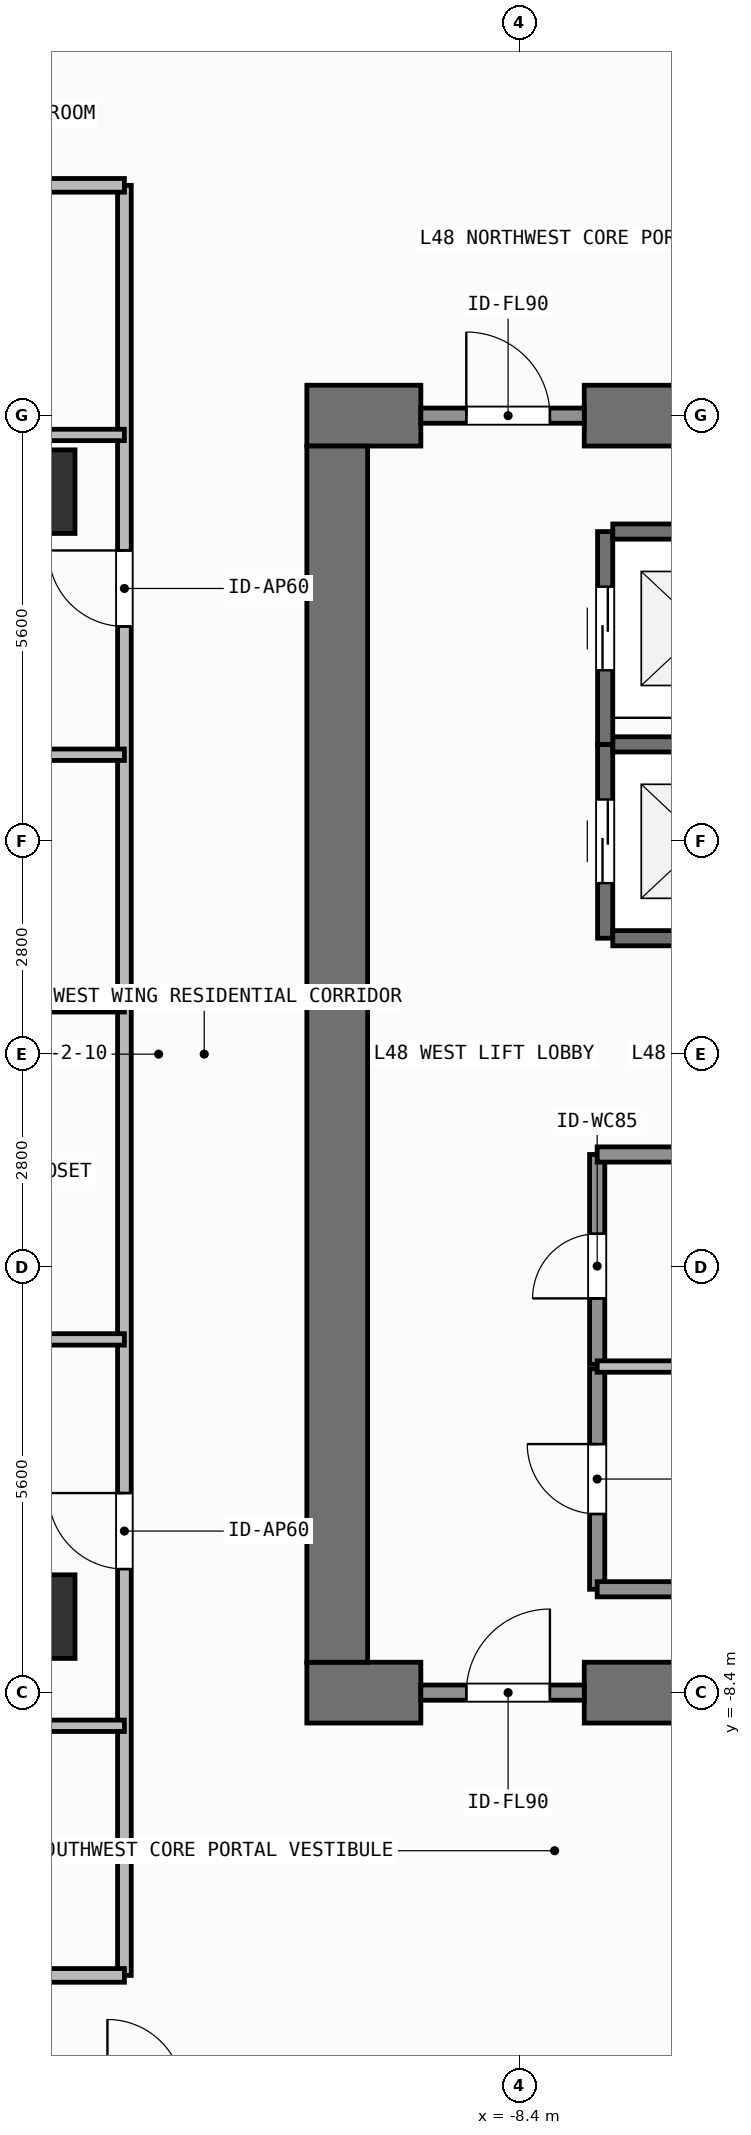
"""IFC4 building model, lengths in metres.
Left out: names, types, materials, properties, quantities, classifications, styles, units other than length and angle.
Written with IfcOpenShell. Run it as: python <this file> out.ifc"""

import sys

from ifc_helpers import new_model, si_unit, direction, frame, frame_2d, origin, origin_2d, place, context, subcontext, project, spatial, rectangle, extrude, element, fill, save


model = new_model("IFC4")
c1 = context("Model", 3, precision=1e-05, world=origin(), true_north=direction((0.0, 1.0)))
c2 = subcontext(c1, "Body", "Model", "MODEL_VIEW")
j1 = project(units=[si_unit("LENGTHUNIT", "METRE"), si_unit("PLANEANGLEUNIT", "RADIAN")], contexts=[c1])
p1 = place(None, origin())
s1 = spatial("IfcSite", under=j1, at=p1, CompositionType="ELEMENT")
p2 = place(p1, origin())
s2 = spatial("IfcBuilding", under=s1, at=p2, CompositionType="ELEMENT")
p3 = place(p2, frame((0.0, 0.0, 195.3)))
s3 = spatial("IfcBuildingStorey", under=s2, at=p3, CompositionType="ELEMENT", Elevation=195.3)
p4 = place(p3, frame((-11.2, -8.4, 0.0), z_axis=(0.0, 0.0, 1.0), x_axis=(1.0, 0.0, 0.0)))
e1 = element("IfcWall", 1, at=p4, inside=s3, PredefinedType="SHEAR", context=c2, shape_type="SweptSolid", body=[
    extrude(rectangle(XDim=1.5, YDim=0.8, at=frame_2d((0.75, 0.0))), origin(), (0.0, 0.0, 1.0), 3.9),
])
p5 = place(p3, frame((-7.55, -8.4, 0.0), z_axis=(0.0, 0.0, 1.0), x_axis=(1.0, 0.0, 0.0)))
e2 = element("IfcWall", 2, at=p5, inside=s3, PredefinedType="SHEAR", context=c2, shape_type="SweptSolid", body=[
    extrude(rectangle(XDim=3.35, YDim=0.8, at=frame_2d((1.675, 0.0))), origin(), (0.0, 0.0, 1.0), 3.9),
])
p6 = place(p3, frame((-11.2, 8.4, 0.0), z_axis=(0.0, 0.0, 1.0), x_axis=(1.0, 0.0, 0.0)))
e3 = element("IfcWall", 3, at=p6, inside=s3, PredefinedType="SHEAR", context=c2, shape_type="SweptSolid", body=[
    extrude(rectangle(XDim=1.5, YDim=0.8, at=frame_2d((0.75, 0.0))), origin(), (0.0, 0.0, 1.0), 3.9),
])
p7 = place(p3, frame((-7.55, 8.4, 0.0), z_axis=(0.0, 0.0, 1.0), x_axis=(1.0, 0.0, 0.0)))
e4 = element("IfcWall", 4, at=p7, inside=s3, PredefinedType="SHEAR", context=c2, shape_type="SweptSolid", body=[
    extrude(rectangle(XDim=16.35, YDim=0.8, at=frame_2d((8.175, 0.0))), origin(), (0.0, 0.0, 1.0), 3.9),
])
p8 = place(p3, frame((-10.8, -8.0, 0.0), z_axis=(0.0, 0.0, 1.0), x_axis=(0.0, 1.0, 0.0)))
e5 = element("IfcWall", 5, at=p8, inside=s3, PredefinedType="SHEAR", context=c2, shape_type="SweptSolid", body=[
    extrude(rectangle(XDim=16.0, YDim=0.8, at=frame_2d((8.0, 0.0))), origin(), (0.0, 0.0, 1.0), 3.9),
])
for number, where, z_axis, x_axis in (
    (6, (-14.8, -7.4, 0.0), (0.0, 0.0, 1.0), (1.0, 0.0, 0.0)),
    (7, (-14.8, 7.4, 0.0), (0.0, 0.0, 1.0), (1.0, 0.0, 0.0)),
):
    element("IfcColumn", number, at=place(p3, frame(where, z_axis=z_axis, x_axis=x_axis)), inside=s3, PredefinedType="COLUMN", context=c2, shape_type="SweptSolid", body=[
        extrude(rectangle(XDim=1.1, YDim=1.1, at=origin_2d()), origin(), (0.0, 0.0, 1.0), 3.9),
    ])
p9 = place(p3, frame((-7.275, 1.525, 0.0), z_axis=(0.0, 0.0, 1.0), x_axis=(0.0, 1.0, 0.0)))
e8 = element("IfcWall", 8, at=p9, inside=s3, PredefinedType="SHEAR", context=c2, shape_type="SweptSolid", body=[
    extrude(rectangle(XDim=2.55, YDim=0.2, at=frame_2d((1.275, 0.0))), origin(), (0.0, 0.0, 1.0), 3.68),
])
p10 = place(p9, frame((0.725, 0.0, 0.0)))
e9 = element("IfcOpeningElement", 9, at=p10, cuts=e8, PredefinedType="OPENING", context=c2, shape_type="SweptSolid", body=[
    extrude(rectangle(XDim=1.1, YDim=2.2, at=frame_2d((0.55, 1.1))), frame((0.0, 0.11, 0.0), z_axis=(0.0, -1.0, 0.0), x_axis=(1.0, 0.0, 0.0)), (0.0, 0.0, 1.0), 0.22),
])
for number, where, z_axis, x_axis in (
    (10, (-7.175, 1.525, 0.0), (0.0, 0.0, 1.0), (1.0, 0.0, 0.0)),
    (11, (-7.175, 4.075, 0.0), (0.0, 0.0, 1.0), (1.0, 0.0, 0.0)),
):
    element("IfcWall", number, at=place(p3, frame(where, z_axis=z_axis, x_axis=x_axis)), inside=s3, PredefinedType="SHEAR", context=c2, shape_type="SweptSolid", body=[
        extrude(rectangle(XDim=2.35, YDim=0.2, at=frame_2d((1.175, 0.0))), origin(), (0.0, 0.0, 1.0), 3.68),
    ])
p11 = place(p3, frame((-7.275, 4.075, 0.0), z_axis=(0.0, 0.0, 1.0), x_axis=(0.0, 1.0, 0.0)))
e12 = element("IfcWall", 12, at=p11, inside=s3, PredefinedType="SHEAR", context=c2, shape_type="SweptSolid", body=[
    extrude(rectangle(XDim=2.8, YDim=0.2, at=frame_2d((1.4, 0.0))), origin(), (0.0, 0.0, 1.0), 3.68),
])
p12 = place(p11, frame((0.975, 0.0, 0.0)))
e13 = element("IfcOpeningElement", 13, at=p12, cuts=e12, PredefinedType="OPENING", context=c2, shape_type="SweptSolid", body=[
    extrude(rectangle(XDim=1.1, YDim=2.2, at=frame_2d((0.55, 1.1))), frame((0.0, 0.11, 0.0), z_axis=(0.0, -1.0, 0.0), x_axis=(1.0, 0.0, 0.0)), (0.0, 0.0, 1.0), 0.22),
])
p13 = place(p3, frame((-7.175, 6.875, 0.0), z_axis=(0.0, 0.0, 1.0), x_axis=(1.0, 0.0, 0.0)))
e14 = element("IfcWall", 14, at=p13, inside=s3, PredefinedType="SHEAR", context=c2, shape_type="SweptSolid", body=[
    extrude(rectangle(XDim=2.35, YDim=0.2, at=frame_2d((1.175, 0.0))), origin(), (0.0, 0.0, 1.0), 3.68),
])
p14 = place(p3, frame((-9.7, -8.4, 0.0), z_axis=(0.0, 0.0, 1.0), x_axis=(1.0, 0.0, 0.0)))
e15 = element("IfcWall", 15, at=p14, inside=s3, PredefinedType="SOLIDWALL", context=c2, shape_type="SweptSolid", body=[
    extrude(rectangle(XDim=2.15, YDim=0.2, at=frame_2d((1.075, 0.0))), origin(), (0.0, 0.0, 1.0), 2.82),
])
p15 = place(p14, frame((0.598, 0.0, 0.0)))
e16 = element("IfcOpeningElement", 16, at=p15, cuts=e15, PredefinedType="OPENING", context=c2, shape_type="SweptSolid", body=[
    extrude(rectangle(XDim=1.1, YDim=2.15, at=frame_2d((0.55, 1.075))), frame((0.0, 0.11, 0.0), z_axis=(0.0, -1.0, 0.0), x_axis=(1.0, 0.0, 0.0)), (0.0, 0.0, 1.0), 0.22),
])
p16 = place(p3, frame((-9.7, 8.4, 0.0), z_axis=(0.0, 0.0, 1.0), x_axis=(1.0, 0.0, 0.0)))
e17 = element("IfcWall", 17, at=p16, inside=s3, PredefinedType="SOLIDWALL", context=c2, shape_type="SweptSolid", body=[
    extrude(rectangle(XDim=2.15, YDim=0.2, at=frame_2d((1.075, 0.0))), origin(), (0.0, 0.0, 1.0), 2.82),
])
p17 = place(p16, frame((0.598, 0.0, 0.0)))
e18 = element("IfcOpeningElement", 18, at=p17, cuts=e17, PredefinedType="OPENING", context=c2, shape_type="SweptSolid", body=[
    extrude(rectangle(XDim=1.1, YDim=2.15, at=frame_2d((0.55, 1.075))), frame((0.0, 0.11, 0.0), z_axis=(0.0, -1.0, 0.0), x_axis=(1.0, 0.0, 0.0)), (0.0, 0.0, 1.0), 0.22),
])
p18 = place(p3, frame((-7.38, -7.04, 0.0), z_axis=(0.0, 0.0, 1.0), x_axis=(0.0, 1.0, 0.0)))
e19 = element("IfcWall", 19, at=p18, inside=s3, PredefinedType="SOLIDWALL", context=c2, shape_type="SweptSolid", body=[
    extrude(rectangle(XDim=2.9, YDim=0.2, at=frame_2d((1.45, 0.0))), origin(), (0.0, 0.0, 1.0), 3.68),
])
p19 = place(p18, frame((0.99, 0.0, 0.0)))
e20 = element("IfcOpeningElement", 20, at=p19, cuts=e19, PredefinedType="OPENING", context=c2, shape_type="SweptSolid", body=[
    extrude(rectangle(XDim=0.92, YDim=2.1, at=frame_2d((0.46, 1.05))), frame((0.0, 0.11, 0.0), z_axis=(0.0, -1.0, 0.0), x_axis=(1.0, 0.0, 0.0)), (0.0, 0.0, 1.0), 0.22),
])
p20 = place(p3, frame((-7.38, -4.08, 0.0), z_axis=(0.0, 0.0, 1.0), x_axis=(0.0, 1.0, 0.0)))
e21 = element("IfcWall", 21, at=p20, inside=s3, PredefinedType="SOLIDWALL", context=c2, shape_type="SweptSolid", body=[
    extrude(rectangle(XDim=2.76, YDim=0.2, at=frame_2d((1.38, 0.0))), origin(), (0.0, 0.0, 1.0), 3.68),
])
p21 = place(p20, frame((0.867, 0.0, 0.0)))
e22 = element("IfcOpeningElement", 22, at=p21, cuts=e21, PredefinedType="OPENING", context=c2, shape_type="SweptSolid", body=[
    extrude(rectangle(XDim=0.85, YDim=2.1, at=frame_2d((0.425, 1.05))), frame((0.0, 0.11, 0.0), z_axis=(0.0, -1.0, 0.0), x_axis=(1.0, 0.0, 0.0)), (0.0, 0.0, 1.0), 0.22),
])
p22 = place(p3, frame((-13.6, -12.12, 0.0), z_axis=(0.0, 0.0, 1.0), x_axis=(0.0, 1.0, 0.0)))
e23 = element("IfcWall", 23, at=p22, inside=s3, PredefinedType="PARTITIONING", context=c2, shape_type="SweptSolid", body=[
    extrude(rectangle(XDim=12.764, YDim=0.18, at=frame_2d((6.382, 0.0))), origin(), (0.0, 0.0, 1.0), 3.68),
])
p23 = place(p22, frame((5.346, 0.0, 0.0)))
e24 = element("IfcOpeningElement", 24, at=p23, cuts=e23, PredefinedType="OPENING", context=c2, shape_type="SweptSolid", body=[
    extrude(rectangle(XDim=1.0, YDim=2.2, at=frame_2d((0.5, 1.1))), frame((0.0, 0.1, 0.0), z_axis=(0.0, -1.0, 0.0), x_axis=(1.0, 0.0, 0.0)), (0.0, 0.0, 1.0), 0.2),
])
p24 = place(p3, frame((-17.83, -3.753, 0.0), z_axis=(0.0, 0.0, 1.0), x_axis=(1.0, 0.0, 0.0)))
e25 = element("IfcWall", 25, at=p24, inside=s3, PredefinedType="PARTITIONING", context=c2, shape_type="SweptSolid", body=[
    extrude(rectangle(XDim=4.23, YDim=0.15, at=frame_2d((2.115, 0.0))), origin(), (0.0, 0.0, 1.0), 3.68),
])
p25 = place(p24, frame((1.6, 0.0, 0.0)))
e26 = element("IfcOpeningElement", 26, at=p25, cuts=e25, PredefinedType="OPENING", context=c2, shape_type="SweptSolid", body=[
    extrude(rectangle(XDim=0.85, YDim=2.1, at=frame_2d((0.425, 1.05))), frame((0.0, 0.085, 0.0), z_axis=(0.0, -1.0, 0.0), x_axis=(1.0, 0.0, 0.0)), (0.0, 0.0, 1.0), 0.17),
])
p26 = place(p3, frame((-20.769, -8.836, 0.0), z_axis=(0.0, 0.0, 1.0), x_axis=(1.0, 0.0, 0.0)))
e27 = element("IfcWall", 27, at=p26, inside=s3, PredefinedType="PARTITIONING", context=c2, shape_type="SweptSolid", body=[
    extrude(rectangle(XDim=7.169, YDim=0.15, at=frame_2d((3.584, 0.0))), origin(), (0.0, 0.0, 1.0), 3.68),
])
p27 = place(p26, frame((3.159, 0.0, 0.0)))
e28 = element("IfcOpeningElement", 28, at=p27, cuts=e27, PredefinedType="OPENING", context=c2, shape_type="SweptSolid", body=[
    extrude(rectangle(XDim=0.85, YDim=2.1, at=frame_2d((0.425, 1.05))), frame((0.0, 0.085, 0.0), z_axis=(0.0, -1.0, 0.0), x_axis=(1.0, 0.0, 0.0)), (0.0, 0.0, 1.0), 0.17),
])
p28 = place(p3, frame((-13.6, 0.644, 0.0), z_axis=(0.0, 0.0, 1.0), x_axis=(0.0, 1.0, 0.0)))
e29 = element("IfcWall", 29, at=p28, inside=s3, PredefinedType="PARTITIONING", context=c2, shape_type="SweptSolid", body=[
    extrude(rectangle(XDim=10.786, YDim=0.18, at=frame_2d((5.393, 0.0))), origin(), (0.0, 0.0, 1.0), 3.68),
])
p29 = place(p28, frame((4.982, 0.0, 0.0)))
e30 = element("IfcOpeningElement", 30, at=p29, cuts=e29, PredefinedType="OPENING", context=c2, shape_type="SweptSolid", body=[
    extrude(rectangle(XDim=1.0, YDim=2.2, at=frame_2d((0.5, 1.1))), frame((0.0, 0.1, 0.0), z_axis=(0.0, -1.0, 0.0), x_axis=(1.0, 0.0, 0.0)), (0.0, 0.0, 1.0), 0.2),
])
p30 = place(p3, frame((-20.769, 8.146, 0.0), z_axis=(0.0, 0.0, 1.0), x_axis=(1.0, 0.0, 0.0)))
e31 = element("IfcWall", 31, at=p30, inside=s3, PredefinedType="PARTITIONING", context=c2, shape_type="SweptSolid", body=[
    extrude(rectangle(XDim=7.169, YDim=0.15, at=frame_2d((3.584, 0.0))), origin(), (0.0, 0.0, 1.0), 3.68),
])
p31 = place(p30, frame((3.159, 0.0, 0.0)))
e32 = element("IfcOpeningElement", 32, at=p31, cuts=e31, PredefinedType="OPENING", context=c2, shape_type="SweptSolid", body=[
    extrude(rectangle(XDim=0.85, YDim=2.1, at=frame_2d((0.425, 1.05))), frame((0.0, 0.085, 0.0), z_axis=(0.0, -1.0, 0.0), x_axis=(1.0, 0.0, 0.0)), (0.0, 0.0, 1.0), 0.17),
])
p32 = place(p3, frame((-20.769, 3.939, 0.0), z_axis=(0.0, 0.0, 1.0), x_axis=(1.0, 0.0, 0.0)))
e33 = element("IfcWall", 33, at=p32, inside=s3, PredefinedType="PARTITIONING", context=c2, shape_type="SweptSolid", body=[
    extrude(rectangle(XDim=7.169, YDim=0.15, at=frame_2d((3.584, 0.0))), origin(), (0.0, 0.0, 1.0), 3.68),
])
p33 = place(p32, frame((3.159, 0.0, 0.0)))
e34 = element("IfcOpeningElement", 34, at=p33, cuts=e33, PredefinedType="OPENING", context=c2, shape_type="SweptSolid", body=[
    extrude(rectangle(XDim=0.85, YDim=2.1, at=frame_2d((0.425, 1.05))), frame((0.0, 0.085, 0.0), z_axis=(0.0, -1.0, 0.0), x_axis=(1.0, 0.0, 0.0)), (0.0, 0.0, 1.0), 0.17),
])
p34 = place(p3, frame((-7.38, -1.32, 0.0), z_axis=(0.0, 0.0, 1.0), x_axis=(1.0, 0.0, 0.0)))
e35 = element("IfcWall", 35, at=p34, inside=s3, PredefinedType="SOLIDWALL", context=c2, shape_type="SweptSolid", body=[
    extrude(rectangle(XDim=2.91, YDim=0.2, at=frame_2d((1.455, 0.0))), origin(), (0.0, 0.0, 1.0), 3.68),
])
p35 = place(p3, frame((-7.38, -7.04, 0.0), z_axis=(0.0, 0.0, 1.0), x_axis=(1.0, 0.0, 0.0)))
e36 = element("IfcWall", 36, at=p35, inside=s3, PredefinedType="SOLIDWALL", context=c2, shape_type="SweptSolid", body=[
    extrude(rectangle(XDim=2.8, YDim=0.2, at=frame_2d((1.4, 0.0))), origin(), (0.0, 0.0, 1.0), 3.68),
])
p36 = place(p3, frame((-7.38, -4.11, 0.0), z_axis=(0.0, 0.0, 1.0), x_axis=(1.0, 0.0, 0.0)))
e37 = element("IfcWall", 37, at=p36, inside=s3, PredefinedType="PARTITIONING", context=c2, shape_type="SweptSolid", body=[
    extrude(rectangle(XDim=2.8, YDim=0.15, at=frame_2d((1.4, 0.0))), origin(), (0.0, 0.0, 1.0), 3.68),
])
for number, where, z_axis, x_axis in (
    (38, (-24.13, 0.644, 0.0), (0.0, 0.0, 1.0), (1.0, 0.0, 0.0)),
    (39, (-24.13, -12.12, 0.0), (0.0, 0.0, 1.0), (1.0, 0.0, 0.0)),
):
    element("IfcWall", number, at=place(p3, frame(where, z_axis=z_axis, x_axis=x_axis)), inside=s3, PredefinedType="PARTITIONING", context=c2, shape_type="SweptSolid", body=[
        extrude(rectangle(XDim=10.53, YDim=0.18, at=frame_2d((5.265, 0.0))), origin(), (0.0, 0.0, 1.0), 3.68),
    ])
p37 = place(p3, frame((-24.13, 11.43, 0.0), z_axis=(0.0, 0.0, 1.0), x_axis=(1.0, 0.0, 0.0)))
e40 = element("IfcWall", 40, at=p37, inside=s3, PredefinedType="PARTITIONING", context=c2, shape_type="SweptSolid", body=[
    extrude(rectangle(XDim=10.53, YDim=0.18, at=frame_2d((5.265, 0.0))), origin(), (0.0, 0.0, 1.0), 3.42),
])
p38 = place(p10, origin())
e41 = element("IfcDoor", 41, at=p38, inside=s3, OperationType="SLIDING_TO_LEFT", PredefinedType="DOOR", context=c2, shape_type="SweptSolid", body=[
    extrude(rectangle(XDim=1.1, YDim=2.2, at=frame_2d((0.55, 1.1))), frame((0.0, 0.025, 0.0), z_axis=(0.0, -1.0, 0.0), x_axis=(1.0, 0.0, 0.0)), (0.0, 0.0, 1.0), 0.05),
])
fill(e9, e41)
p39 = place(p12, origin())
e42 = element("IfcDoor", 42, at=p39, inside=s3, OperationType="SLIDING_TO_LEFT", PredefinedType="DOOR", context=c2, shape_type="SweptSolid", body=[
    extrude(rectangle(XDim=1.1, YDim=2.2, at=frame_2d((0.55, 1.1))), frame((0.0, 0.025, 0.0), z_axis=(0.0, -1.0, 0.0), x_axis=(1.0, 0.0, 0.0)), (0.0, 0.0, 1.0), 0.05),
])
fill(e13, e42)
p40 = place(p15, origin())
e43 = element("IfcDoor", 43, at=p40, inside=s3, OperationType="SINGLE_SWING_RIGHT", PredefinedType="DOOR", context=c2, shape_type="SweptSolid", body=[
    extrude(rectangle(XDim=1.1, YDim=2.15, at=frame_2d((0.55, 1.075))), frame((0.0, 0.025, 0.0), z_axis=(0.0, -1.0, 0.0), x_axis=(1.0, 0.0, 0.0)), (0.0, 0.0, 1.0), 0.05),
])
fill(e16, e43)
p41 = place(p17, origin())
e44 = element("IfcDoor", 44, at=p41, inside=s3, OperationType="SINGLE_SWING_LEFT", PredefinedType="DOOR", context=c2, shape_type="SweptSolid", body=[
    extrude(rectangle(XDim=1.1, YDim=2.15, at=frame_2d((0.55, 1.075))), frame((0.0, 0.025, 0.0), z_axis=(0.0, -1.0, 0.0), x_axis=(1.0, 0.0, 0.0)), (0.0, 0.0, 1.0), 0.05),
])
fill(e18, e44)
p42 = place(p19, origin())
e45 = element("IfcDoor", 45, at=p42, inside=s3, OperationType="SINGLE_SWING_RIGHT", PredefinedType="DOOR", context=c2, shape_type="SweptSolid", body=[
    extrude(rectangle(XDim=0.92, YDim=2.1, at=frame_2d((0.46, 1.05))), frame((0.0, 0.025, 0.0), z_axis=(0.0, -1.0, 0.0), x_axis=(1.0, 0.0, 0.0)), (0.0, 0.0, 1.0), 0.05),
])
fill(e20, e45)
p43 = place(p21, origin())
e46 = element("IfcDoor", 46, at=p43, inside=s3, OperationType="SINGLE_SWING_LEFT", PredefinedType="DOOR", context=c2, shape_type="SweptSolid", body=[
    extrude(rectangle(XDim=0.85, YDim=2.1, at=frame_2d((0.425, 1.05))), frame((0.0, 0.025, 0.0), z_axis=(0.0, -1.0, 0.0), x_axis=(1.0, 0.0, 0.0)), (0.0, 0.0, 1.0), 0.05),
])
fill(e22, e46)
p44 = place(p23, origin())
e47 = element("IfcDoor", 47, at=p44, inside=s3, OperationType="SINGLE_SWING_RIGHT", PredefinedType="DOOR", context=c2, shape_type="SweptSolid", body=[
    extrude(rectangle(XDim=1.0, YDim=2.2, at=frame_2d((0.5, 1.1))), frame((0.0, 0.025, 0.0), z_axis=(0.0, -1.0, 0.0), x_axis=(1.0, 0.0, 0.0)), (0.0, 0.0, 1.0), 0.05),
])
fill(e24, e47)
p45 = place(p29, origin())
e48 = element("IfcDoor", 48, at=p45, inside=s3, OperationType="SINGLE_SWING_RIGHT", PredefinedType="DOOR", context=c2, shape_type="SweptSolid", body=[
    extrude(rectangle(XDim=1.0, YDim=2.2, at=frame_2d((0.5, 1.1))), frame((0.0, 0.025, 0.0), z_axis=(0.0, -1.0, 0.0), x_axis=(1.0, 0.0, 0.0)), (0.0, 0.0, 1.0), 0.05),
])
fill(e30, e48)
save(model, sys.argv[1])
